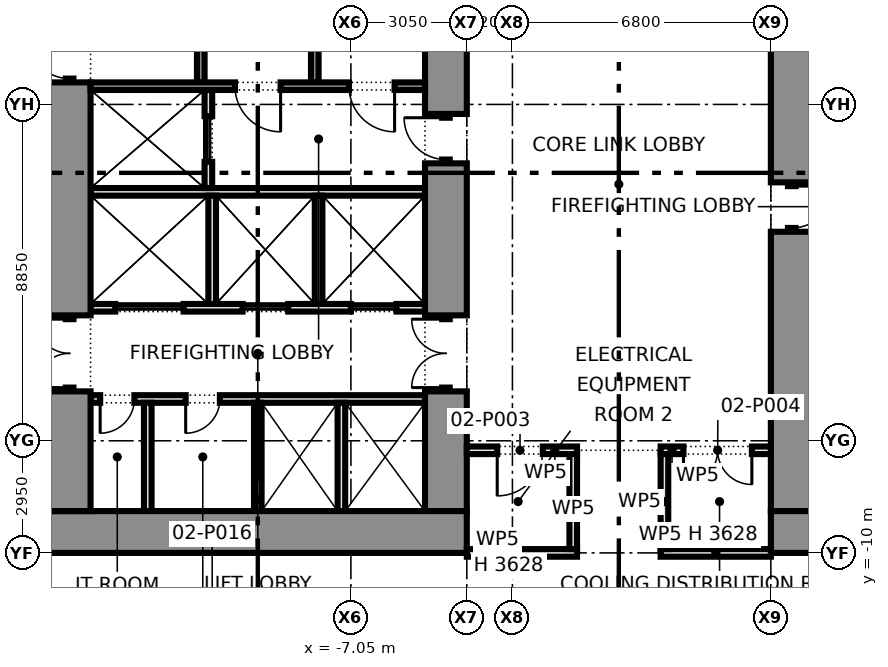
"""IFC4 building model, lengths in metres.
Left out: names, types, materials, properties, quantities, classifications, styles, units other than length and angle.
Written with IfcOpenShell. Run it as: python <this file> out.ifc"""

import sys

from ifc_helpers import new_model, si_unit, direction, frame, frame_2d, origin, place, context, subcontext, project, spatial, rectangle, extrude, element, fill, save


model = new_model("IFC4")
c1 = context("Model", 3, precision=1e-05, world=origin(), true_north=direction((0.0, 1.0)))
c2 = subcontext(c1, "Body", "Model", "MODEL_VIEW")
j1 = project(units=[si_unit("LENGTHUNIT", "METRE"), si_unit("PLANEANGLEUNIT", "RADIAN")], contexts=[c1])
p1 = place(None, origin())
s1 = spatial("IfcSite", under=j1, at=p1, CompositionType="ELEMENT")
p2 = place(p1, origin())
s2 = spatial("IfcBuilding", under=s1, at=p2, CompositionType="ELEMENT")
p3 = place(p2, frame((0.0, 0.0, 6.5)))
s3 = spatial("IfcBuildingStorey", under=s2, at=p3, CompositionType="ELEMENT", Elevation=6.5)
p4 = place(p3, frame((-15.0, -9.45, 0.0), z_axis=(0.0, 0.0, 1.0), x_axis=(1.0, 0.0, 0.0)))
e1 = element("IfcWall", 1, at=p4, inside=s3, PredefinedType="SHEAR", context=c2, shape_type="SweptSolid", body=[
    extrude(rectangle(XDim=11.0, YDim=1.1, at=frame_2d((5.5, 0.0))), origin(), (0.0, 0.0, 1.0), 4.575),
])
p5 = place(p3, frame((-14.45, -8.9, 0.0), z_axis=(0.0, 0.0, 1.0), x_axis=(0.0, 1.0, 0.0)))
e2 = element("IfcWall", 2, at=p5, inside=s3, PredefinedType="SHEAR", context=c2, shape_type="SweptSolid", body=[
    extrude(rectangle(XDim=3.15, YDim=1.1, at=frame_2d((1.575, 0.0))), origin(), (0.0, 0.0, 1.0), 4.575),
])
p6 = place(p3, frame((-14.45, -5.75, 0.0), z_axis=(0.0, 0.0, 1.0), x_axis=(0.0, 1.0, 0.0)))
e3 = element("IfcWall", 3, at=p6, inside=s3, PredefinedType="PARTITIONING", context=c2, shape_type="SweptSolid", body=[
    extrude(rectangle(XDim=2.0, YDim=0.2, at=frame_2d((1.0, 0.0))), origin(), (0.0, 0.0, 1.0), 2.4),
])
p7 = place(p6, frame((0.1, 0.0, 0.0)))
e4 = element("IfcOpeningElement", 4, at=p7, cuts=e3, PredefinedType="OPENING", context=c2, shape_type="SweptSolid", body=[
    extrude(rectangle(XDim=1.8, YDim=2.1, at=frame_2d((0.9, 1.05))), frame((0.0, 0.11, 0.0), z_axis=(0.0, -1.0, 0.0), x_axis=(1.0, 0.0, 0.0)), (0.0, 0.0, 1.0), 0.22),
])
p8 = place(p3, frame((-14.45, -3.75, 0.0), z_axis=(0.0, 0.0, 1.0), x_axis=(0.0, 1.0, 0.0)))
e5 = element("IfcWall", 5, at=p8, inside=s3, PredefinedType="SHEAR", context=c2, shape_type="SweptSolid", body=[
    extrude(rectangle(XDim=6.13, YDim=1.1, at=frame_2d((3.065, 0.0))), origin(), (0.0, 0.0, 1.0), 4.575),
])
p9 = place(p3, frame((-14.45, 2.38, 0.0), z_axis=(0.0, 0.0, 1.0), x_axis=(0.0, 1.0, 0.0)))
e6 = element("IfcWall", 6, at=p9, inside=s3, PredefinedType="SHEAR", context=c2, shape_type="SweptSolid", body=[
    extrude(rectangle(XDim=1.3, YDim=0.2, at=frame_2d((0.65, 0.0))), origin(), (0.0, 0.0, 1.0), 2.4),
])
p10 = place(p9, frame((0.1, 0.0, 0.0)))
e7 = element("IfcOpeningElement", 7, at=p10, cuts=e6, PredefinedType="OPENING", context=c2, shape_type="SweptSolid", body=[
    extrude(rectangle(XDim=1.1, YDim=2.1, at=frame_2d((0.55, 1.05))), frame((0.0, 0.11, 0.0), z_axis=(0.0, -1.0, 0.0), x_axis=(1.0, 0.0, 0.0)), (0.0, 0.0, 1.0), 0.22),
])
p11 = place(p3, frame((-4.55, -8.9, 0.0), z_axis=(0.0, 0.0, 1.0), x_axis=(0.0, 1.0, 0.0)))
e8 = element("IfcWall", 8, at=p11, inside=s3, PredefinedType="SHEAR", context=c2, shape_type="SweptSolid", body=[
    extrude(rectangle(XDim=3.15, YDim=1.1, at=frame_2d((1.575, 0.0))), origin(), (0.0, 0.0, 1.0), 4.575),
])
p12 = place(p3, frame((-4.55, -5.75, 0.0), z_axis=(0.0, 0.0, 1.0), x_axis=(0.0, 1.0, 0.0)))
e9 = element("IfcWall", 9, at=p12, inside=s3, PredefinedType="PARTITIONING", context=c2, shape_type="SweptSolid", body=[
    extrude(rectangle(XDim=2.0, YDim=0.2, at=frame_2d((1.0, 0.0))), origin(), (0.0, 0.0, 1.0), 2.4),
])
p13 = place(p12, frame((0.1, 0.0, 0.0)))
e10 = element("IfcOpeningElement", 10, at=p13, cuts=e9, PredefinedType="OPENING", context=c2, shape_type="SweptSolid", body=[
    extrude(rectangle(XDim=1.8, YDim=2.1, at=frame_2d((0.9, 1.05))), frame((0.0, 0.11, 0.0), z_axis=(0.0, -1.0, 0.0), x_axis=(1.0, 0.0, 0.0)), (0.0, 0.0, 1.0), 0.22),
])
p14 = place(p3, frame((-4.55, -3.75, 0.0), z_axis=(0.0, 0.0, 1.0), x_axis=(0.0, 1.0, 0.0)))
e11 = element("IfcWall", 11, at=p14, inside=s3, PredefinedType="SHEAR", context=c2, shape_type="SweptSolid", body=[
    extrude(rectangle(XDim=4.0, YDim=1.1, at=frame_2d((2.0, 0.0))), origin(), (0.0, 0.0, 1.0), 4.575),
])
p15 = place(p3, frame((-4.55, 0.25, 0.0), z_axis=(0.0, 0.0, 1.0), x_axis=(0.0, 1.0, 0.0)))
e12 = element("IfcWall", 12, at=p15, inside=s3, PredefinedType="PARTITIONING", context=c2, shape_type="SweptSolid", body=[
    extrude(rectangle(XDim=1.3, YDim=0.2, at=frame_2d((0.65, 0.0))), origin(), (0.0, 0.0, 1.0), 2.4),
])
p16 = place(p15, frame((0.1, 0.0, 0.0)))
e13 = element("IfcOpeningElement", 13, at=p16, cuts=e12, PredefinedType="OPENING", context=c2, shape_type="SweptSolid", body=[
    extrude(rectangle(XDim=1.1, YDim=2.1, at=frame_2d((0.55, 1.05))), frame((0.0, 0.11, 0.0), z_axis=(0.0, -1.0, 0.0), x_axis=(1.0, 0.0, 0.0)), (0.0, 0.0, 1.0), 0.22),
])
p17 = place(p3, frame((-4.55, 1.55, 0.0), z_axis=(0.0, 0.0, 1.0), x_axis=(0.0, 1.0, 0.0)))
e14 = element("IfcWall", 14, at=p17, inside=s3, PredefinedType="SHEAR", context=c2, shape_type="SweptSolid", body=[
    extrude(rectangle(XDim=7.35, YDim=1.1, at=frame_2d((3.675, 0.0))), origin(), (0.0, 0.0, 1.0), 4.575),
])
p18 = place(p3, frame((-13.9, -5.95, 0.0), z_axis=(0.0, 0.0, 1.0), x_axis=(1.0, 0.0, 0.0)))
e15 = element("IfcWall", 15, at=p18, inside=s3, PredefinedType="PARTITIONING", context=c2, shape_type="SweptSolid", body=[
    extrude(rectangle(XDim=8.8, YDim=0.2, at=frame_2d((4.4, 0.0))), origin(), (0.0, 0.0, 1.0), 4.575),
])
p19 = place(p18, frame((0.252, 0.0, 0.0)))
e16 = element("IfcOpeningElement", 16, at=p19, cuts=e15, PredefinedType="OPENING", context=c2, shape_type="SweptSolid", body=[
    extrude(rectangle(XDim=0.9, YDim=2.1, at=frame_2d((0.45, 1.05))), frame((0.0, 0.11, 0.0), z_axis=(0.0, -1.0, 0.0), x_axis=(1.0, 0.0, 0.0)), (0.0, 0.0, 1.0), 0.22),
])
p20 = place(p18, frame((2.502, 0.0, 0.0)))
e17 = element("IfcOpeningElement", 17, at=p20, cuts=e15, PredefinedType="OPENING", context=c2, shape_type="SweptSolid", body=[
    extrude(rectangle(XDim=0.9, YDim=2.1, at=frame_2d((0.45, 1.05))), frame((0.0, 0.11, 0.0), z_axis=(0.0, -1.0, 0.0), x_axis=(1.0, 0.0, 0.0)), (0.0, 0.0, 1.0), 0.22),
])
p21 = place(p3, frame((-13.9, -3.55, 0.0), z_axis=(0.0, 0.0, 1.0), x_axis=(1.0, 0.0, 0.0)))
e18 = element("IfcWall", 18, at=p21, inside=s3, PredefinedType="PARTITIONING", context=c2, shape_type="SweptSolid", body=[
    extrude(rectangle(XDim=8.8, YDim=0.2, at=frame_2d((4.4, 0.0))), origin(), (0.0, 0.0, 1.0), 4.575),
])
p22 = place(p21, frame((0.65, 0.0, 0.0)))
e19 = element("IfcOpeningElement", 19, at=p22, cuts=e18, PredefinedType="OPENING", context=c2, shape_type="SweptSolid", body=[
    extrude(rectangle(XDim=1.8, YDim=2.1, at=frame_2d((0.9, 1.05))), frame((0.0, 0.11, 0.0), z_axis=(0.0, -1.0, 0.0), x_axis=(1.0, 0.0, 0.0)), (0.0, 0.0, 1.0), 0.22),
])
p23 = place(p21, frame((4.0, 0.0, 0.0)))
e20 = element("IfcOpeningElement", 20, at=p23, cuts=e18, PredefinedType="OPENING", context=c2, shape_type="SweptSolid", body=[
    extrude(rectangle(XDim=1.2, YDim=2.1, at=frame_2d((0.6, 1.05))), frame((0.0, 0.11, 0.0), z_axis=(0.0, -1.0, 0.0), x_axis=(1.0, 0.0, 0.0)), (0.0, 0.0, 1.0), 0.22),
])
p24 = place(p21, frame((6.85, 0.0, 0.0)))
e21 = element("IfcOpeningElement", 21, at=p24, cuts=e18, PredefinedType="OPENING", context=c2, shape_type="SweptSolid", body=[
    extrude(rectangle(XDim=1.2, YDim=2.1, at=frame_2d((0.6, 1.05))), frame((0.0, 0.11, 0.0), z_axis=(0.0, -1.0, 0.0), x_axis=(1.0, 0.0, 0.0)), (0.0, 0.0, 1.0), 0.22),
])
p25 = place(p3, frame((-13.9, -0.5, 0.0), z_axis=(0.0, 0.0, 1.0), x_axis=(1.0, 0.0, 0.0)))
e22 = element("IfcWall", 22, at=p25, inside=s3, PredefinedType="PARTITIONING", context=c2, shape_type="SweptSolid", body=[
    extrude(rectangle(XDim=8.8, YDim=0.2, at=frame_2d((4.4, 0.0))), origin(), (0.0, 0.0, 1.0), 4.575),
])
p26 = place(p3, frame((-10.8, -0.4, 0.0), z_axis=(0.0, 0.0, 1.0), x_axis=(0.0, 1.0, 0.0)))
e23 = element("IfcWall", 23, at=p26, inside=s3, PredefinedType="PARTITIONING", context=c2, shape_type="SweptSolid", body=[
    extrude(rectangle(XDim=2.58, YDim=0.2, at=frame_2d((1.29, 0.0))), origin(), (0.0, 0.0, 1.0), 4.575),
])
p27 = place(p26, frame((0.69, 0.0, 0.0)))
e24 = element("IfcOpeningElement", 24, at=p27, cuts=e23, PredefinedType="OPENING", context=c2, shape_type="SweptSolid", body=[
    extrude(rectangle(XDim=1.2, YDim=2.1, at=frame_2d((0.6, 1.05))), frame((0.0, 0.11, 0.0), z_axis=(0.0, -1.0, 0.0), x_axis=(1.0, 0.0, 0.0)), (0.0, 0.0, 1.0), 0.22),
])
p28 = place(p3, frame((-13.9, 2.28, 0.0), z_axis=(0.0, 0.0, 1.0), x_axis=(1.0, 0.0, 0.0)))
e25 = element("IfcWall", 25, at=p28, inside=s3, PredefinedType="SHEAR", context=c2, shape_type="SweptSolid", body=[
    extrude(rectangle(XDim=8.8, YDim=0.2, at=frame_2d((4.4, 0.0))), origin(), (0.0, 0.0, 1.0), 4.575),
])
p29 = place(p28, frame((3.8, 0.0, 0.0)))
e26 = element("IfcOpeningElement", 26, at=p29, cuts=e25, PredefinedType="OPENING", context=c2, shape_type="SweptSolid", body=[
    extrude(rectangle(XDim=1.2, YDim=2.1, at=frame_2d((0.6, 1.05))), frame((0.0, 0.11, 0.0), z_axis=(0.0, -1.0, 0.0), x_axis=(1.0, 0.0, 0.0)), (0.0, 0.0, 1.0), 0.22),
])
p30 = place(p28, frame((6.8, 0.0, 0.0)))
e27 = element("IfcOpeningElement", 27, at=p30, cuts=e25, PredefinedType="OPENING", context=c2, shape_type="SweptSolid", body=[
    extrude(rectangle(XDim=1.2, YDim=2.1, at=frame_2d((0.6, 1.05))), frame((0.0, 0.11, 0.0), z_axis=(0.0, -1.0, 0.0), x_axis=(1.0, 0.0, 0.0)), (0.0, 0.0, 1.0), 0.22),
])
for number, where, z_axis, x_axis in (
    (28, (-11.0, 2.38, 0.0), (0.0, 0.0, 1.0), (0.0, 1.0, 0.0)),
    (29, (-8.0, 2.38, 0.0), (0.0, 0.0, 1.0), (0.0, 1.0, 0.0)),
):
    element("IfcWall", number, at=place(p3, frame(where, z_axis=z_axis, x_axis=x_axis)), inside=s3, PredefinedType="SHEAR", context=c2, shape_type="SweptSolid", body=[
        extrude(rectangle(XDim=6.52, YDim=0.2, at=frame_2d((3.26, 0.0))), origin(), (0.0, 0.0, 1.0), 4.575),
    ])
for number, where, z_axis, x_axis in (
    (30, (-9.5, -8.9, 0.0), (0.0, 0.0, 1.0), (0.0, 1.0, 0.0)),
    (31, (-7.3, -8.9, 0.0), (0.0, 0.0, 1.0), (0.0, 1.0, 0.0)),
    (32, (-12.395, -8.9, 0.0), (0.0, 0.0, 1.0), (0.0, 1.0, 0.0)),
    (33, (-10.7, -3.45, 0.0), (0.0, 0.0, 1.0), (0.0, 1.0, 0.0)),
    (34, (-7.9, -3.45, 0.0), (0.0, 0.0, 1.0), (0.0, 1.0, 0.0)),
):
    element("IfcWall", number, at=place(p3, frame(where, z_axis=z_axis, x_axis=x_axis)), inside=s3, PredefinedType="PARTITIONING", context=c2, shape_type="SweptSolid", body=[
        extrude(rectangle(XDim=2.85, YDim=0.2, at=frame_2d((1.425, 0.0))), origin(), (0.0, 0.0, 1.0), 4.575),
    ])
p31 = place(p3, frame((15.0, -9.45, 0.0), z_axis=(0.0, 0.0, 1.0), x_axis=(-1.0, 0.0, 0.0)))
e35 = element("IfcWall", 35, at=p31, inside=s3, PredefinedType="SHEAR", context=c2, shape_type="SweptSolid", body=[
    extrude(rectangle(XDim=11.0, YDim=1.1, at=frame_2d((5.5, 0.0))), origin(), (0.0, 0.0, 1.0), 4.575),
])
p32 = place(p3, frame((4.55, 3.75, 0.0), z_axis=(0.0, 0.0, 1.0), x_axis=(0.0, -1.0, 0.0)))
e36 = element("IfcWall", 36, at=p32, inside=s3, PredefinedType="SHEAR", context=c2, shape_type="SweptSolid", body=[
    extrude(rectangle(XDim=4.0, YDim=1.1, at=frame_2d((2.0, 0.0))), origin(), (0.0, 0.0, 1.0), 4.575),
])
p33 = place(p3, frame((4.55, -0.25, 0.0), z_axis=(0.0, 0.0, 1.0), x_axis=(0.0, -1.0, 0.0)))
e37 = element("IfcWall", 37, at=p33, inside=s3, PredefinedType="PARTITIONING", context=c2, shape_type="SweptSolid", body=[
    extrude(rectangle(XDim=1.3, YDim=0.2, at=frame_2d((0.65, 0.0))), origin(), (0.0, 0.0, 1.0), 2.4),
])
p34 = place(p33, frame((0.1, 0.0, 0.0)))
e38 = element("IfcOpeningElement", 38, at=p34, cuts=e37, PredefinedType="OPENING", context=c2, shape_type="SweptSolid", body=[
    extrude(rectangle(XDim=1.1, YDim=2.1, at=frame_2d((0.55, 1.05))), frame((0.0, 0.11, 0.0), z_axis=(0.0, -1.0, 0.0), x_axis=(1.0, 0.0, 0.0)), (0.0, 0.0, 1.0), 0.22),
])
p35 = place(p3, frame((4.55, -1.55, 0.0), z_axis=(0.0, 0.0, 1.0), x_axis=(0.0, -1.0, 0.0)))
e39 = element("IfcWall", 39, at=p35, inside=s3, PredefinedType="SHEAR", context=c2, shape_type="SweptSolid", body=[
    extrude(rectangle(XDim=7.35, YDim=1.1, at=frame_2d((3.675, 0.0))), origin(), (0.0, 0.0, 1.0), 4.575),
])
for number, where, z_axis, x_axis in (
    (40, (-4.0, -10.0, 0.0), (0.0, 0.0, 1.0), (1.0, 0.0, 0.0)),
    (41, (1.1, -10.0, 0.0), (0.0, 0.0, 1.0), (1.0, 0.0, 0.0)),
):
    element("IfcWall", number, at=place(p3, frame(where, z_axis=z_axis, x_axis=x_axis)), inside=s3, PredefinedType="PARTITIONING", context=c2, shape_type="SweptSolid", body=[
        extrude(rectangle(XDim=2.9, YDim=0.2, at=frame_2d((1.45, 0.0))), origin(), (0.0, 0.0, 1.0), 3.628),
    ])
p36 = place(p3, frame((-4.0, -7.3, 0.0), z_axis=(0.0, 0.0, 1.0), x_axis=(1.0, 0.0, 0.0)))
e42 = element("IfcWall", 42, at=p36, inside=s3, PredefinedType="PARTITIONING", context=c2, shape_type="SweptSolid", body=[
    extrude(rectangle(XDim=2.9, YDim=0.2, at=frame_2d((1.45, 0.0))), origin(), (0.0, 0.0, 1.0), 4.575),
])
p37 = place(p36, frame((0.8, 0.0, 0.0)))
e43 = element("IfcOpeningElement", 43, at=p37, cuts=e42, PredefinedType="OPENING", context=c2, shape_type="SweptSolid", body=[
    extrude(rectangle(XDim=1.2, YDim=2.1, at=frame_2d((0.6, 1.05))), frame((0.0, 0.11, 0.0), z_axis=(0.0, -1.0, 0.0), x_axis=(1.0, 0.0, 0.0)), (0.0, 0.0, 1.0), 0.22),
])
p38 = place(p3, frame((1.1, -7.3, 0.0), z_axis=(0.0, 0.0, 1.0), x_axis=(1.0, 0.0, 0.0)))
e44 = element("IfcWall", 44, at=p38, inside=s3, PredefinedType="PARTITIONING", context=c2, shape_type="SweptSolid", body=[
    extrude(rectangle(XDim=2.9, YDim=0.2, at=frame_2d((1.45, 0.0))), origin(), (0.0, 0.0, 1.0), 4.575),
])
p39 = place(p38, frame((0.6, 0.0, 0.0)))
e45 = element("IfcOpeningElement", 45, at=p39, cuts=e44, PredefinedType="OPENING", context=c2, shape_type="SweptSolid", body=[
    extrude(rectangle(XDim=1.8, YDim=2.1, at=frame_2d((0.9, 1.05))), frame((0.0, 0.11, 0.0), z_axis=(0.0, -1.0, 0.0), x_axis=(1.0, 0.0, 0.0)), (0.0, 0.0, 1.0), 0.22),
])
for number, where, z_axis, x_axis in (
    (46, (1.2, -9.9, 0.0), (0.0, 0.0, 1.0), (0.0, 1.0, 0.0)),
    (47, (-1.2, -9.9, 0.0), (0.0, 0.0, 1.0), (0.0, 1.0, 0.0)),
):
    element("IfcWall", number, at=place(p3, frame(where, z_axis=z_axis, x_axis=x_axis)), inside=s3, PredefinedType="PARTITIONING", context=c2, shape_type="SweptSolid", body=[
        extrude(rectangle(XDim=2.5, YDim=0.2, at=frame_2d((1.25, 0.0))), origin(), (0.0, 0.0, 1.0), 4.575),
    ])
p40 = place(p7, origin())
e48 = element("IfcDoor", 48, at=p40, inside=s3, OperationType="DOUBLE_DOOR_SINGLE_SWING", PredefinedType="DOOR", context=c2, shape_type="SweptSolid", body=[
    extrude(rectangle(XDim=1.8, YDim=2.1, at=frame_2d((0.9, 1.05))), frame((0.0, 0.025, 0.0), z_axis=(0.0, -1.0, 0.0), x_axis=(1.0, 0.0, 0.0)), (0.0, 0.0, 1.0), 0.05),
])
fill(e4, e48)
p41 = place(p10, origin())
e49 = element("IfcDoor", 49, at=p41, inside=s3, OperationType="SINGLE_SWING_RIGHT", PredefinedType="DOOR", context=c2, shape_type="SweptSolid", body=[
    extrude(rectangle(XDim=1.1, YDim=2.1, at=frame_2d((0.55, 1.05))), frame((0.0, 0.025, 0.0), z_axis=(0.0, -1.0, 0.0), x_axis=(1.0, 0.0, 0.0)), (0.0, 0.0, 1.0), 0.05),
])
fill(e7, e49)
p42 = place(p13, origin())
e50 = element("IfcDoor", 50, at=p42, inside=s3, OperationType="DOUBLE_DOOR_SINGLE_SWING", PredefinedType="DOOR", context=c2, shape_type="SweptSolid", body=[
    extrude(rectangle(XDim=1.8, YDim=2.1, at=frame_2d((0.9, 1.05))), frame((0.0, 0.025, 0.0), z_axis=(0.0, -1.0, 0.0), x_axis=(1.0, 0.0, 0.0)), (0.0, 0.0, 1.0), 0.05),
])
fill(e10, e50)
p43 = place(p16, origin())
e51 = element("IfcDoor", 51, at=p43, inside=s3, OperationType="SINGLE_SWING_RIGHT", PredefinedType="DOOR", context=c2, shape_type="SweptSolid", body=[
    extrude(rectangle(XDim=1.1, YDim=2.1, at=frame_2d((0.55, 1.05))), frame((0.0, 0.025, 0.0), z_axis=(0.0, -1.0, 0.0), x_axis=(1.0, 0.0, 0.0)), (0.0, 0.0, 1.0), 0.05),
])
fill(e13, e51)
p44 = place(p22, origin())
e52 = element("IfcDoor", 52, at=p44, inside=s3, OperationType="DOUBLE_DOOR_SLIDING", PredefinedType="DOOR", context=c2, shape_type="SweptSolid", body=[
    extrude(rectangle(XDim=1.8, YDim=2.1, at=frame_2d((0.9, 1.05))), frame((0.0, 0.025, 0.0), z_axis=(0.0, -1.0, 0.0), x_axis=(1.0, 0.0, 0.0)), (0.0, 0.0, 1.0), 0.05),
])
fill(e19, e52)
p45 = place(p23, origin())
e53 = element("IfcDoor", 53, at=p45, inside=s3, OperationType="DOUBLE_DOOR_SLIDING", PredefinedType="DOOR", context=c2, shape_type="SweptSolid", body=[
    extrude(rectangle(XDim=1.2, YDim=2.1, at=frame_2d((0.6, 1.05))), frame((0.0, 0.025, 0.0), z_axis=(0.0, -1.0, 0.0), x_axis=(1.0, 0.0, 0.0)), (0.0, 0.0, 1.0), 0.05),
])
fill(e20, e53)
p46 = place(p24, origin())
e54 = element("IfcDoor", 54, at=p46, inside=s3, OperationType="DOUBLE_DOOR_SLIDING", PredefinedType="DOOR", context=c2, shape_type="SweptSolid", body=[
    extrude(rectangle(XDim=1.2, YDim=2.1, at=frame_2d((0.6, 1.05))), frame((0.0, 0.025, 0.0), z_axis=(0.0, -1.0, 0.0), x_axis=(1.0, 0.0, 0.0)), (0.0, 0.0, 1.0), 0.05),
])
fill(e21, e54)
p47 = place(p27, origin())
e55 = element("IfcDoor", 55, at=p47, inside=s3, OperationType="DOUBLE_DOOR_SLIDING", PredefinedType="DOOR", context=c2, shape_type="SweptSolid", body=[
    extrude(rectangle(XDim=1.2, YDim=2.1, at=frame_2d((0.6, 1.05))), frame((0.0, 0.025, 0.0), z_axis=(0.0, -1.0, 0.0), x_axis=(1.0, 0.0, 0.0)), (0.0, 0.0, 1.0), 0.05),
])
fill(e24, e55)
p48 = place(p19, frame((0.9, 0.0, 0.0), z_axis=(0.0, 0.0, 1.0), x_axis=(-1.0, 0.0, 0.0)))
e56 = element("IfcDoor", 56, at=p48, inside=s3, OperationType="SINGLE_SWING_RIGHT", PredefinedType="DOOR", context=c2, shape_type="SweptSolid", body=[
    extrude(rectangle(XDim=0.9, YDim=2.1, at=frame_2d((0.45, 1.05))), frame((0.0, 0.025, 0.0), z_axis=(0.0, -1.0, 0.0), x_axis=(1.0, 0.0, 0.0)), (0.0, 0.0, 1.0), 0.05),
])
fill(e16, e56)
p49 = place(p20, frame((0.9, 0.0, 0.0), z_axis=(0.0, 0.0, 1.0), x_axis=(-1.0, 0.0, 0.0)))
e57 = element("IfcDoor", 57, at=p49, inside=s3, OperationType="SINGLE_SWING_RIGHT", PredefinedType="DOOR", context=c2, shape_type="SweptSolid", body=[
    extrude(rectangle(XDim=0.9, YDim=2.1, at=frame_2d((0.45, 1.05))), frame((0.0, 0.025, 0.0), z_axis=(0.0, -1.0, 0.0), x_axis=(1.0, 0.0, 0.0)), (0.0, 0.0, 1.0), 0.05),
])
fill(e17, e57)
p50 = place(p29, frame((1.2, 0.0, 0.0), z_axis=(0.0, 0.0, 1.0), x_axis=(-1.0, 0.0, 0.0)))
e58 = element("IfcDoor", 58, at=p50, inside=s3, OperationType="SINGLE_SWING_LEFT", PredefinedType="DOOR", context=c2, shape_type="SweptSolid", body=[
    extrude(rectangle(XDim=1.2, YDim=2.1, at=frame_2d((0.6, 1.05))), frame((0.0, 0.025, 0.0), z_axis=(0.0, -1.0, 0.0), x_axis=(1.0, 0.0, 0.0)), (0.0, 0.0, 1.0), 0.05),
])
fill(e26, e58)
p51 = place(p30, frame((1.2, 0.0, 0.0), z_axis=(0.0, 0.0, 1.0), x_axis=(-1.0, 0.0, 0.0)))
e59 = element("IfcDoor", 59, at=p51, inside=s3, OperationType="SINGLE_SWING_LEFT", PredefinedType="DOOR", context=c2, shape_type="SweptSolid", body=[
    extrude(rectangle(XDim=1.2, YDim=2.1, at=frame_2d((0.6, 1.05))), frame((0.0, 0.025, 0.0), z_axis=(0.0, -1.0, 0.0), x_axis=(1.0, 0.0, 0.0)), (0.0, 0.0, 1.0), 0.05),
])
fill(e27, e59)
p52 = place(p34, origin())
e60 = element("IfcDoor", 60, at=p52, inside=s3, OperationType="SINGLE_SWING_LEFT", PredefinedType="DOOR", context=c2, shape_type="SweptSolid", body=[
    extrude(rectangle(XDim=1.1, YDim=2.1, at=frame_2d((0.55, 1.05))), frame((0.0, 0.025, 0.0), z_axis=(0.0, -1.0, 0.0), x_axis=(1.0, 0.0, 0.0)), (0.0, 0.0, 1.0), 0.05),
])
fill(e38, e60)
p53 = place(p37, frame((1.2, 0.0, 0.0), z_axis=(0.0, 0.0, 1.0), x_axis=(-1.0, 0.0, 0.0)))
e61 = element("IfcDoor", 61, at=p53, inside=s3, OperationType="SINGLE_SWING_RIGHT", PredefinedType="DOOR", context=c2, shape_type="SweptSolid", body=[
    extrude(rectangle(XDim=1.2, YDim=2.1, at=frame_2d((0.6, 1.05))), frame((0.0, 0.025, 0.0), z_axis=(0.0, -1.0, 0.0), x_axis=(1.0, 0.0, 0.0)), (0.0, 0.0, 1.0), 0.05),
])
fill(e43, e61)
p54 = place(p39, frame((1.8, 0.0, 0.0), z_axis=(0.0, 0.0, 1.0), x_axis=(-1.0, 0.0, 0.0)))
e62 = element("IfcDoor", 62, at=p54, inside=s3, OperationType="DOUBLE_DOOR_SINGLE_SWING", PredefinedType="DOOR", context=c2, shape_type="SweptSolid", body=[
    extrude(rectangle(XDim=1.8, YDim=2.1, at=frame_2d((0.9, 1.05))), frame((0.0, 0.025, 0.0), z_axis=(0.0, -1.0, 0.0), x_axis=(1.0, 0.0, 0.0)), (0.0, 0.0, 1.0), 0.05),
])
fill(e45, e62)
save(model, sys.argv[1])
